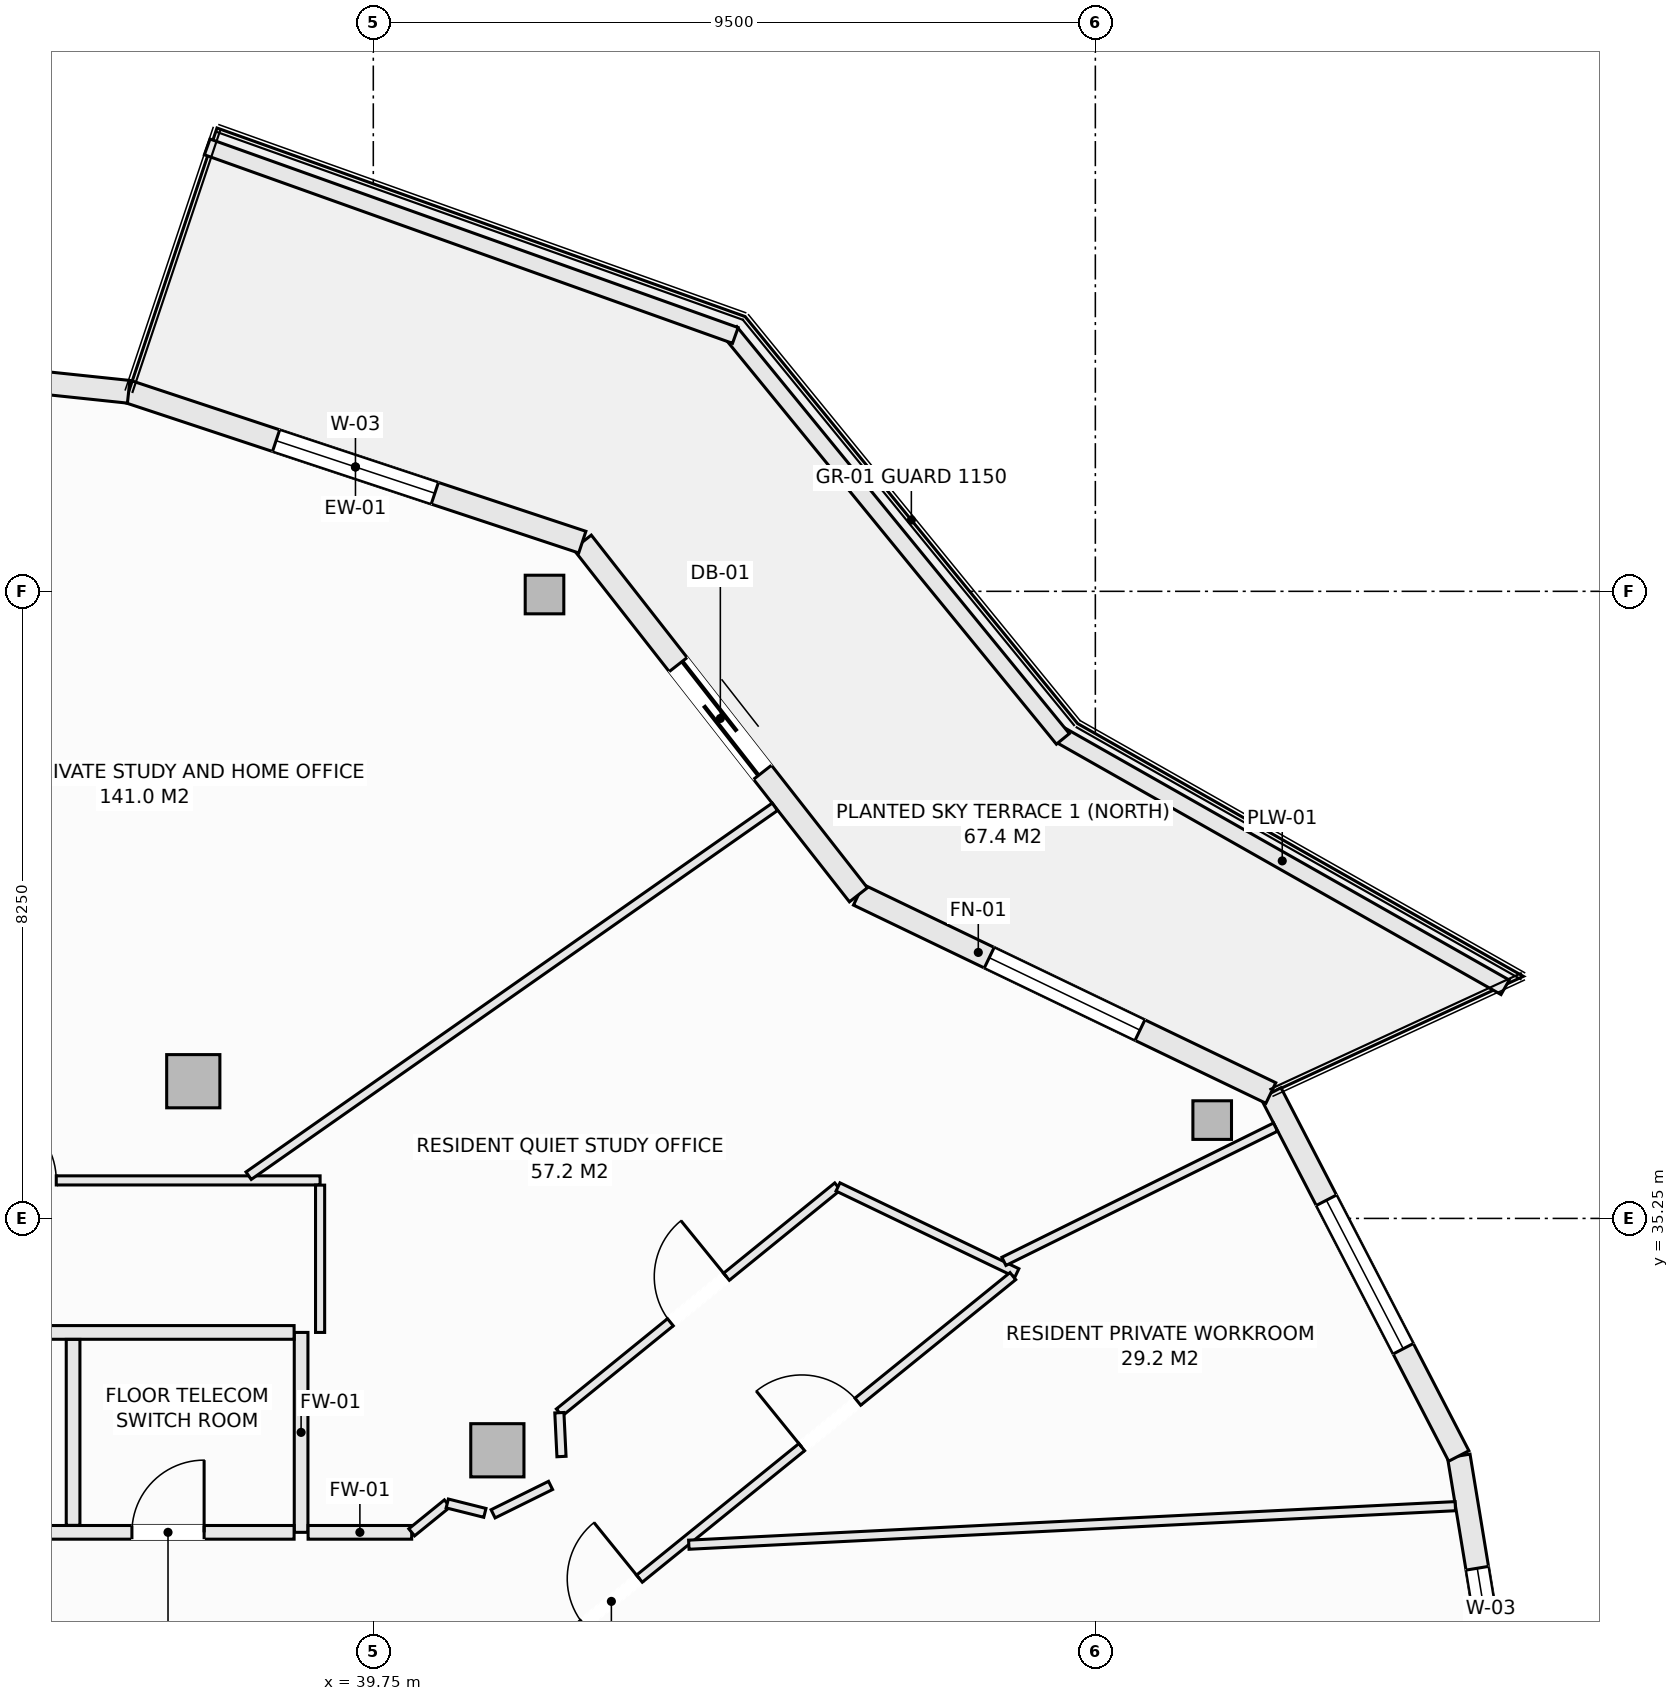
"""IFC4 building model, lengths in metres.
Left out: names, types, materials, properties, quantities, classifications, styles, units other than length and angle.
Written with IfcOpenShell. Run it as: python <this file> out.ifc"""

import sys

from ifc_helpers import new_model, si_unit, direction, frame, frame_2d, origin, origin_2d, place, context, subcontext, project, spatial, rectangle, hollow_rectangle, extrude, element, fill, save


model = new_model("IFC4")
c1 = context("Model", 3, precision=1e-05, world=origin(), true_north=direction((0.0, 1.0)))
c2 = subcontext(c1, "Body", "Model", "MODEL_VIEW")
j1 = project(units=[si_unit("LENGTHUNIT", "METRE"), si_unit("PLANEANGLEUNIT", "RADIAN")], contexts=[c1])
p1 = place(None, origin())
s1 = spatial("IfcSite", under=j1, at=p1, CompositionType="ELEMENT")
p2 = place(p1, origin())
s2 = spatial("IfcBuilding", under=s1, at=p2, CompositionType="ELEMENT")
p3 = place(p2, frame((0.0, 0.0, 219.5)))
s3 = spatial("IfcBuildingStorey", under=s2, at=p3, CompositionType="ELEMENT", Elevation=219.5)
for number, where, z_axis, x_axis in (
    (1, (50.787, 36.544, -0.27), (0.0, 0.0, 1.0), (1.0, 0.0, 0.0)),
    (2, (42.003, 43.458, -0.27), (0.0, 0.0, 1.0), (1.0, 0.0, 0.0)),
):
    element("IfcColumn", number, at=place(p3, frame(where, z_axis=z_axis, x_axis=x_axis)), inside=s3, PredefinedType="COLUMN", context=c2, shape_type="SweptSolid", body=[
        extrude(hollow_rectangle(XDim=0.508, YDim=0.508, WallThickness=0.019, at=origin_2d()), origin(), (0.0, 0.0, 1.0), 3.3),
    ])
for number, where, z_axis, x_axis in (
    (3, (41.382, 32.199, -0.27), (0.0, 0.0, 1.0), (1.0, 0.0, 0.0)),
    (4, (37.382, 37.055, -0.27), (0.0, 0.0, 1.0), (1.0, 0.0, 0.0)),
):
    element("IfcColumn", number, at=place(p3, frame(where, z_axis=z_axis, x_axis=x_axis)), inside=s3, PredefinedType="COLUMN", context=c2, shape_type="SweptSolid", body=[
        extrude(rectangle(XDim=0.7, YDim=0.7, at=origin_2d()), origin(), (0.0, 0.0, 1.0), 3.3),
    ])
p4 = place(p3, frame((54.032, 32.125, 0.0), z_axis=(0.0, 0.0, 1.0), x_axis=(0.16237087798, -0.986729799886, 0.0)))
e5 = element("IfcWall", 5, at=p4, inside=s3, PredefinedType="SOLIDWALL", context=c2, shape_type="SweptSolid", body=[
    extrude(rectangle(XDim=5.193, YDim=0.3, at=frame_2d((2.597, 0.0))), origin(), (0.0, 0.0, 1.0), 2.605),
])
p5 = place(p4, frame((1.497, 0.0, 0.72)))
e6 = element("IfcOpeningElement", 6, at=p5, cuts=e5, PredefinedType="OPENING", context=c2, shape_type="SweptSolid", body=[
    extrude(rectangle(XDim=2.2, YDim=1.65, at=frame_2d((1.1, 0.825))), frame((0.0, 0.16, 0.0), z_axis=(0.0, -1.0, 0.0), x_axis=(1.0, 0.0, 0.0)), (0.0, 0.0, 1.0), 0.32),
])
p6 = place(p3, frame((51.559, 36.9, 0.0), z_axis=(0.0, 0.0, 1.0), x_axis=(0.459808219482, -0.888018243786, 0.0)))
e7 = element("IfcWall", 7, at=p6, inside=s3, PredefinedType="SOLIDWALL", context=c2, shape_type="SweptSolid", body=[
    extrude(rectangle(XDim=5.378, YDim=0.3, at=frame_2d((2.689, 0.0))), origin(), (0.0, 0.0, 1.0), 2.605),
])
p7 = place(p6, frame((1.589, 0.0, 0.72)))
e8 = element("IfcOpeningElement", 8, at=p7, cuts=e7, PredefinedType="OPENING", context=c2, shape_type="SweptSolid", body=[
    extrude(rectangle(XDim=2.2, YDim=1.65, at=frame_2d((1.1, 0.825))), frame((0.0, 0.16, 0.0), z_axis=(0.0, -1.0, 0.0), x_axis=(1.0, 0.0, 0.0)), (0.0, 0.0, 1.0), 0.32),
])
p8 = place(p3, frame((46.133, 39.507, 0.0), z_axis=(0.0, 0.0, 1.0), x_axis=(0.901348331142, -0.433094892545, 0.0)))
e9 = element("IfcWall", 9, at=p8, inside=s3, PredefinedType="SOLIDWALL", context=c2, shape_type="SweptSolid", body=[
    extrude(rectangle(XDim=6.021, YDim=0.3, at=frame_2d((3.01, 0.0))), origin(), (0.0, 0.0, 1.0), 2.605),
])
p9 = place(p8, frame((1.91, 0.0, 0.72)))
e10 = element("IfcOpeningElement", 10, at=p9, cuts=e9, PredefinedType="OPENING", context=c2, shape_type="SweptSolid", body=[
    extrude(rectangle(XDim=2.2, YDim=1.65, at=frame_2d((1.1, 0.825))), frame((0.0, 0.16, 0.0), z_axis=(0.0, -1.0, 0.0), x_axis=(1.0, 0.0, 0.0)), (0.0, 0.0, 1.0), 0.32),
])
p10 = place(p3, frame((42.5, 44.147, 0.0), z_axis=(0.0, 0.0, 1.0), x_axis=(0.616450126935, -0.787393955401, 0.0)))
e11 = element("IfcWall", 11, at=p10, inside=s3, PredefinedType="SOLIDWALL", context=c2, shape_type="SweptSolid", body=[
    extrude(rectangle(XDim=5.893, YDim=0.3, at=frame_2d((2.946, 0.0))), origin(), (0.0, 0.0, 1.0), 2.605),
])
p11 = place(p10, frame((2.046, 0.0, 0.0)))
e12 = element("IfcOpeningElement", 12, at=p11, cuts=e11, PredefinedType="OPENING", context=c2, shape_type="SweptSolid", body=[
    extrude(rectangle(XDim=1.8, YDim=2.25, at=frame_2d((0.9, 1.125))), frame((0.0, 0.16, 0.0), z_axis=(0.0, -1.0, 0.0), x_axis=(1.0, 0.0, 0.0)), (0.0, 0.0, 1.0), 0.32),
])
p12 = place(p3, frame((36.531, 46.125, 0.0), z_axis=(0.0, 0.0, 1.0), x_axis=(0.949240877604, -0.314550085495, 0.0)))
e13 = element("IfcWall", 13, at=p12, inside=s3, PredefinedType="SOLIDWALL", context=c2, shape_type="SweptSolid", body=[
    extrude(rectangle(XDim=6.288, YDim=0.3, at=frame_2d((3.144, 0.0))), origin(), (0.0, 0.0, 1.0), 2.605),
])
p13 = place(p12, frame((2.044, 0.0, 0.72)))
e14 = element("IfcOpeningElement", 14, at=p13, cuts=e13, PredefinedType="OPENING", context=c2, shape_type="SweptSolid", body=[
    extrude(rectangle(XDim=2.2, YDim=1.65, at=frame_2d((1.1, 0.825))), frame((0.0, 0.16, 0.0), z_axis=(0.0, -1.0, 0.0), x_axis=(1.0, 0.0, 0.0)), (0.0, 0.0, 1.0), 0.32),
])
p14 = place(p3, frame((30.125, 46.8, 0.0), z_axis=(0.0, 0.0, 1.0), x_axis=(0.994497142298, -0.104763705363, 0.0)))
e15 = element("IfcWall", 15, at=p14, inside=s3, PredefinedType="SOLIDWALL", context=c2, shape_type="SweptSolid", body=[
    extrude(rectangle(XDim=6.441, YDim=0.3, at=frame_2d((3.221, 0.0))), origin(), (0.0, 0.0, 1.0), 2.605),
])
p15 = place(p14, frame((2.121, 0.0, 0.72)))
e16 = element("IfcOpeningElement", 16, at=p15, cuts=e15, PredefinedType="OPENING", context=c2, shape_type="SweptSolid", body=[
    extrude(rectangle(XDim=2.2, YDim=1.65, at=frame_2d((1.1, 0.825))), frame((0.0, 0.16, 0.0), z_axis=(0.0, -1.0, 0.0), x_axis=(1.0, 0.0, 0.0)), (0.0, 0.0, 1.0), 0.32),
])
p16 = place(p3, frame((48.776, 41.617, 0.0), z_axis=(0.0, 0.0, 1.0), x_axis=(0.869860619267, -0.493297580623, 0.0)))
e17 = element("IfcWall", 17, at=p16, inside=s3, PredefinedType="PARAPET", context=c2, shape_type="SweptSolid", body=[
    extrude(rectangle(XDim=6.743, YDim=0.22, at=frame_2d((3.371, 0.0))), origin(), (0.0, 0.0, 1.0), 0.52),
])
p17 = place(p3, frame((44.448, 46.913, 0.0), z_axis=(0.0, 0.0, 1.0), x_axis=(0.632697312147, -0.774399193699, 0.0)))
e18 = element("IfcWall", 18, at=p17, inside=s3, PredefinedType="PARAPET", context=c2, shape_type="SweptSolid", body=[
    extrude(rectangle(XDim=6.914, YDim=0.22, at=frame_2d((3.457, 0.0))), origin(), (0.0, 0.0, 1.0), 0.52),
])
p18 = place(p3, frame((37.565, 49.347, 0.0), z_axis=(0.0, 0.0, 1.0), x_axis=(0.941780086523, -0.336229488042, 0.0)))
e19 = element("IfcWall", 19, at=p18, inside=s3, PredefinedType="PARAPET", context=c2, shape_type="SweptSolid", body=[
    extrude(rectangle(XDim=7.378, YDim=0.22, at=frame_2d((3.689, 0.0))), origin(), (0.0, 0.0, 1.0), 0.52),
])
p19 = place(p3, frame((38.8, 31.12, 0.0), z_axis=(0.0, 0.0, 1.0), x_axis=(0.0, 1.0, 0.0)))
e20 = element("IfcWall", 20, at=p19, inside=s3, PredefinedType="SOLIDWALL", context=c2, shape_type="SweptSolid", body=[
    extrude(rectangle(XDim=2.63, YDim=0.18, at=frame_2d((1.315, 0.0))), origin(), (0.0, 0.0, 1.0), 3.03),
])
p20 = place(p3, frame((30.077, 31.12, 0.0), z_axis=(0.0, 0.0, 1.0), x_axis=(1.0, 0.0, 0.0)))
e21 = element("IfcWall", 21, at=p20, inside=s3, PredefinedType="SOLIDWALL", context=c2, shape_type="SweptSolid", body=[
    extrude(rectangle(XDim=8.631, YDim=0.18, at=frame_2d((4.315, 0.0))), origin(), (0.0, 0.0, 1.0), 3.03),
])
p21 = place(p20, frame((2.592, 0.0, 0.0)))
e22 = element("IfcOpeningElement", 22, at=p21, cuts=e21, PredefinedType="OPENING", context=c2, shape_type="SweptSolid", body=[
    extrude(rectangle(XDim=0.95, YDim=2.1, at=frame_2d((0.475, 1.05))), frame((0.0, 0.1, 0.0), z_axis=(0.0, -1.0, 0.0), x_axis=(1.0, 0.0, 0.0)), (0.0, 0.0, 1.0), 0.2),
])
p22 = place(p20, frame((6.497, 0.0, 0.0)))
e23 = element("IfcOpeningElement", 23, at=p22, cuts=e21, PredefinedType="OPENING", context=c2, shape_type="SweptSolid", body=[
    extrude(rectangle(XDim=0.95, YDim=2.1, at=frame_2d((0.475, 1.05))), frame((0.0, 0.1, 0.0), z_axis=(0.0, -1.0, 0.0), x_axis=(1.0, 0.0, 0.0)), (0.0, 0.0, 1.0), 0.2),
])
p23 = place(p3, frame((38.892, 31.12, 0.0), z_axis=(0.0, 0.0, 1.0), x_axis=(1.0, 0.0, 0.0)))
e24 = element("IfcWall", 24, at=p23, inside=s3, PredefinedType="SOLIDWALL", context=c2, shape_type="SweptSolid", body=[
    extrude(rectangle(XDim=1.363, YDim=0.18, at=frame_2d((0.681, 0.0))), origin(), (0.0, 0.0, 1.0), 3.03),
])
p24 = place(p3, frame((30.077, 33.75, 0.0), z_axis=(0.0, 0.0, 1.0), x_axis=(1.0, 0.0, 0.0)))
e25 = element("IfcWall", 25, at=p24, inside=s3, PredefinedType="SOLIDWALL", context=c2, shape_type="SweptSolid", body=[
    extrude(rectangle(XDim=8.631, YDim=0.18, at=frame_2d((4.315, 0.0))), origin(), (0.0, 0.0, 1.0), 3.03),
])
p25 = place(p3, frame((35.8, 31.212, 0.0), z_axis=(0.0, 0.0, 1.0), x_axis=(0.0, 1.0, 0.0)))
e26 = element("IfcWall", 26, at=p25, inside=s3, PredefinedType="SOLIDWALL", context=c2, shape_type="SweptSolid", body=[
    extrude(rectangle(XDim=2.446, YDim=0.18, at=frame_2d((1.223, 0.0))), origin(), (0.0, 0.0, 1.0), 3.03),
])
p26 = place(p3, frame((30.062, 35.75, 0.0), z_axis=(0.0, 0.0, 1.0), x_axis=(1.0, 0.0, 0.0)))
e27 = element("IfcWall", 27, at=p26, inside=s3, PredefinedType="PARTITIONING", context=c2, shape_type="SweptSolid", body=[
    extrude(rectangle(XDim=8.988, YDim=0.12, at=frame_2d((4.494, 0.0))), origin(), (0.0, 0.0, 1.0), 2.478),
])
p27 = place(p26, frame((4.567, 0.0, 0.0)))
e28 = element("IfcOpeningElement", 28, at=p27, cuts=e27, PredefinedType="OPENING", context=c2, shape_type="SweptSolid", body=[
    extrude(rectangle(XDim=0.95, YDim=2.1, at=frame_2d((0.475, 1.05))), frame((0.0, 0.07, 0.0), z_axis=(0.0, -1.0, 0.0), x_axis=(1.0, 0.0, 0.0)), (0.0, 0.0, 1.0), 0.14),
])
p28 = place(p3, frame((39.05, 33.75, 0.0), z_axis=(0.0, 0.0, 1.0), x_axis=(0.0, 1.0, 0.0)))
e29 = element("IfcWall", 29, at=p28, inside=s3, PredefinedType="PARTITIONING", context=c2, shape_type="SweptSolid", body=[
    extrude(rectangle(XDim=1.938, YDim=0.12, at=frame_2d((0.969, 0.0))), origin(), (0.0, 0.0, 1.0), 3.03),
])
p29 = place(p3, frame((40.255, 31.12, 0.0), z_axis=(0.0, 0.0, 1.0), x_axis=(0.776423627794, 0.630211353598, 0.0)))
e30 = element("IfcWall", 30, at=p29, inside=s3, PredefinedType="PARTITIONING", context=c2, shape_type="SweptSolid", body=[
    extrude(rectangle(XDim=0.603, YDim=0.12, at=frame_2d((0.301, 0.0))), origin(), (0.0, 0.0, 1.0), 3.03),
])
p30 = place(p3, frame((42.196, 32.696, 0.0), z_axis=(0.0, 0.0, 1.0), x_axis=(0.776319732197, 0.630339331949, 0.0)))
e31 = element("IfcWall", 31, at=p30, inside=s3, PredefinedType="PARTITIONING", context=c2, shape_type="SweptSolid", body=[
    extrude(rectangle(XDim=4.718, YDim=0.12, at=frame_2d((2.359, 0.0))), origin(), (0.0, 0.0, 1.0), 2.77),
])
p31 = place(p30, frame((1.884, 0.0, 0.0)))
e32 = element("IfcOpeningElement", 32, at=p31, cuts=e31, PredefinedType="OPENING", context=c2, shape_type="SweptSolid", body=[
    extrude(rectangle(XDim=0.95, YDim=2.1, at=frame_2d((0.475, 1.05))), frame((0.0, 0.07, 0.0), z_axis=(0.0, -1.0, 0.0), x_axis=(1.0, 0.0, 0.0)), (0.0, 0.0, 1.0), 0.14),
])
p32 = place(p3, frame((40.723, 31.5, 0.0), z_axis=(0.0, 0.0, 1.0), x_axis=(0.970029850173, -0.24298578101, 0.0)))
e33 = element("IfcWall", 33, at=p32, inside=s3, PredefinedType="PARTITIONING", context=c2, shape_type="SweptSolid", body=[
    extrude(rectangle(XDim=0.51, YDim=0.12, at=frame_2d((0.255, 0.0))), origin(), (0.0, 0.0, 1.0), 3.03),
])
p33 = place(p3, frame((42.198, 32.694, 0.0), z_axis=(0.0, 0.0, 1.0), x_axis=(0.048629948931, -0.998816864128, 0.0)))
e34 = element("IfcWall", 34, at=p33, inside=s3, PredefinedType="PARTITIONING", context=c2, shape_type="SweptSolid", body=[
    extrude(rectangle(XDim=0.577, YDim=0.12, at=frame_2d((0.289, 0.0))), origin(), (0.0, 0.0, 1.0), 3.03),
])
p34 = place(p3, frame((45.864, 35.664, 0.0), z_axis=(0.0, 0.0, 1.0), x_axis=(0.901492416592, -0.432794896951, 0.0)))
e35 = element("IfcWall", 35, at=p34, inside=s3, PredefinedType="PARTITIONING", context=c2, shape_type="SweptSolid", body=[
    extrude(rectangle(XDim=2.611, YDim=0.12, at=frame_2d((1.306, 0.0))), origin(), (0.0, 0.0, 1.0), 3.03),
])
p35 = place(p3, frame((41.52, 29.108, 0.0), z_axis=(0.0, 0.0, 1.0), x_axis=(0.777032738693, 0.629460183808, 0.0)))
e36 = element("IfcWall", 36, at=p35, inside=s3, PredefinedType="PARTITIONING", context=c2, shape_type="SweptSolid", body=[
    extrude(rectangle(XDim=8.552, YDim=0.12, at=frame_2d((4.276, 0.0))), origin(), (0.0, 0.0, 1.0), 3.03),
])
p36 = place(p35, frame((1.278, 0.0, 0.0)))
e37 = element("IfcOpeningElement", 37, at=p36, cuts=e36, PredefinedType="OPENING", context=c2, shape_type="SweptSolid", body=[
    extrude(rectangle(XDim=0.95, YDim=2.1, at=frame_2d((0.475, 1.05))), frame((0.0, 0.07, 0.0), z_axis=(0.0, -1.0, 0.0), x_axis=(1.0, 0.0, 0.0)), (0.0, 0.0, 1.0), 0.14),
])
p37 = place(p35, frame((4.977, 0.0, 0.0)))
e38 = element("IfcOpeningElement", 38, at=p37, cuts=e36, PredefinedType="OPENING", context=c2, shape_type="SweptSolid", body=[
    extrude(rectangle(XDim=0.95, YDim=2.1, at=frame_2d((0.475, 1.05))), frame((0.0, 0.07, 0.0), z_axis=(0.0, -1.0, 0.0), x_axis=(1.0, 0.0, 0.0)), (0.0, 0.0, 1.0), 0.14),
])
p38 = place(p3, frame((43.901, 30.957, 0.0), z_axis=(0.0, 0.0, 1.0), x_axis=(0.998738311517, 0.050217378547, 0.0)))
e39 = element("IfcWall", 39, at=p38, inside=s3, PredefinedType="PARTITIONING", context=c2, shape_type="SweptSolid", body=[
    extrude(rectangle(XDim=10.098, YDim=0.12, at=frame_2d((5.049, 0.0))), origin(), (0.0, 0.0, 1.0), 3.03),
])
p39 = place(p3, frame((41.326, 31.364, 0.0), z_axis=(0.0, 0.0, 1.0), x_axis=(0.896444200568, 0.443156626112, 0.0)))
e40 = element("IfcWall", 40, at=p39, inside=s3, PredefinedType="PARTITIONING", context=c2, shape_type="SweptSolid", body=[
    extrude(rectangle(XDim=0.844, YDim=0.12, at=frame_2d((0.422, 0.0))), origin(), (0.0, 0.0, 1.0), 3.03),
])
p40 = place(p3, frame((48.047, 34.685, 0.0), z_axis=(0.0, 0.0, 1.0), x_axis=(0.896512119569, 0.443019208912, 0.0)))
e41 = element("IfcWall", 41, at=p40, inside=s3, PredefinedType="PARTITIONING", context=c2, shape_type="SweptSolid", body=[
    extrude(rectangle(XDim=3.986, YDim=0.12, at=frame_2d((1.993, 0.0))), origin(), (0.0, 0.0, 1.0), 3.03),
])
p41 = place(p3, frame((38.11, 35.812, 0.0), z_axis=(0.0, 0.0, 1.0), x_axis=(0.81888313017, 0.57396029403, 0.0)))
e42 = element("IfcWall", 42, at=p41, inside=s3, PredefinedType="PARTITIONING", context=c2, shape_type="SweptSolid", body=[
    extrude(rectangle(XDim=8.455, YDim=0.12, at=frame_2d((4.228, 0.0))), origin(), (0.0, 0.0, 1.0), 3.03),
])
p42 = place(p5, origin())
e43 = element("IfcWindow", 43, at=p42, inside=s3, PartitioningType="SINGLE_PANEL", PredefinedType="WINDOW", context=c2, shape_type="SweptSolid", body=[
    extrude(rectangle(XDim=2.2, YDim=1.65, at=frame_2d((1.1, 0.825))), frame((0.0, 0.03, 0.0), z_axis=(0.0, -1.0, 0.0), x_axis=(1.0, 0.0, 0.0)), (0.0, 0.0, 1.0), 0.06),
])
fill(e6, e43)
p43 = place(p7, origin())
e44 = element("IfcWindow", 44, at=p43, inside=s3, PartitioningType="SINGLE_PANEL", PredefinedType="WINDOW", context=c2, shape_type="SweptSolid", body=[
    extrude(rectangle(XDim=2.2, YDim=1.65, at=frame_2d((1.1, 0.825))), frame((0.0, 0.03, 0.0), z_axis=(0.0, -1.0, 0.0), x_axis=(1.0, 0.0, 0.0)), (0.0, 0.0, 1.0), 0.06),
])
fill(e8, e44)
p44 = place(p9, origin())
e45 = element("IfcWindow", 45, at=p44, inside=s3, PartitioningType="SINGLE_PANEL", PredefinedType="WINDOW", context=c2, shape_type="SweptSolid", body=[
    extrude(rectangle(XDim=2.2, YDim=1.65, at=frame_2d((1.1, 0.825))), frame((0.0, 0.03, 0.0), z_axis=(0.0, -1.0, 0.0), x_axis=(1.0, 0.0, 0.0)), (0.0, 0.0, 1.0), 0.06),
])
fill(e10, e45)
p45 = place(p11, origin())
e46 = element("IfcDoor", 46, at=p45, inside=s3, OperationType="SLIDING_TO_LEFT", PredefinedType="DOOR", context=c2, shape_type="SweptSolid", body=[
    extrude(rectangle(XDim=1.8, YDim=2.25, at=frame_2d((0.9, 1.125))), frame((0.0, 0.025, 0.0), z_axis=(0.0, -1.0, 0.0), x_axis=(1.0, 0.0, 0.0)), (0.0, 0.0, 1.0), 0.05),
])
fill(e12, e46)
p46 = place(p13, origin())
e47 = element("IfcWindow", 47, at=p46, inside=s3, PartitioningType="SINGLE_PANEL", PredefinedType="WINDOW", context=c2, shape_type="SweptSolid", body=[
    extrude(rectangle(XDim=2.2, YDim=1.65, at=frame_2d((1.1, 0.825))), frame((0.0, 0.03, 0.0), z_axis=(0.0, -1.0, 0.0), x_axis=(1.0, 0.0, 0.0)), (0.0, 0.0, 1.0), 0.06),
])
fill(e14, e47)
p47 = place(p22, origin())
e48 = element("IfcDoor", 48, at=p47, inside=s3, OperationType="SINGLE_SWING_RIGHT", PredefinedType="DOOR", context=c2, shape_type="SweptSolid", body=[
    extrude(rectangle(XDim=0.95, YDim=2.1, at=frame_2d((0.475, 1.05))), frame((0.0, 0.025, 0.0), z_axis=(0.0, -1.0, 0.0), x_axis=(1.0, 0.0, 0.0)), (0.0, 0.0, 1.0), 0.05),
])
fill(e23, e48)
p48 = place(p36, origin())
e49 = element("IfcDoor", 49, at=p48, inside=s3, OperationType="SINGLE_SWING_RIGHT", PredefinedType="DOOR", context=c2, shape_type="SweptSolid", body=[
    extrude(rectangle(XDim=0.95, YDim=2.1, at=frame_2d((0.475, 1.05))), frame((0.0, 0.025, 0.0), z_axis=(0.0, -1.0, 0.0), x_axis=(1.0, 0.0, 0.0)), (0.0, 0.0, 1.0), 0.05),
])
fill(e37, e49)
p49 = place(p37, origin())
e50 = element("IfcDoor", 50, at=p49, inside=s3, OperationType="SINGLE_SWING_LEFT", PredefinedType="DOOR", context=c2, shape_type="SweptSolid", body=[
    extrude(rectangle(XDim=0.95, YDim=2.1, at=frame_2d((0.475, 1.05))), frame((0.0, 0.025, 0.0), z_axis=(0.0, -1.0, 0.0), x_axis=(1.0, 0.0, 0.0)), (0.0, 0.0, 1.0), 0.05),
])
fill(e38, e50)
p50 = place(p31, origin())
e51 = element("IfcDoor", 51, at=p50, inside=s3, OperationType="SINGLE_SWING_RIGHT", PredefinedType="DOOR", context=c2, shape_type="SweptSolid", body=[
    extrude(rectangle(XDim=0.95, YDim=2.1, at=frame_2d((0.475, 1.05))), frame((0.0, 0.025, 0.0), z_axis=(0.0, -1.0, 0.0), x_axis=(1.0, 0.0, 0.0)), (0.0, 0.0, 1.0), 0.05),
])
fill(e32, e51)
p51 = place(p27, origin())
e52 = element("IfcDoor", 52, at=p51, inside=s3, OperationType="SINGLE_SWING_LEFT", PredefinedType="DOOR", context=c2, shape_type="SweptSolid", body=[
    extrude(rectangle(XDim=0.95, YDim=2.1, at=frame_2d((0.475, 1.05))), frame((0.0, 0.025, 0.0), z_axis=(0.0, -1.0, 0.0), x_axis=(1.0, 0.0, 0.0)), (0.0, 0.0, 1.0), 0.05),
])
fill(e28, e52)
save(model, sys.argv[1])
